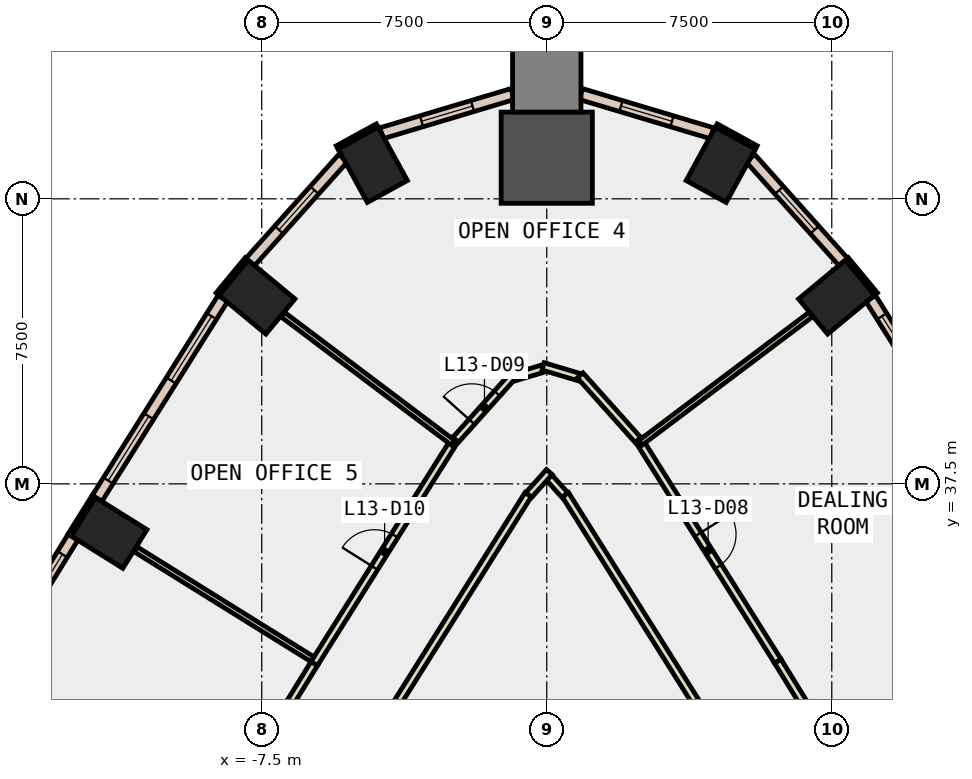
"""IFC4 building model, lengths in metres.
Left out: names, types, materials, properties, quantities, classifications, styles, units other than length and angle.
Written with IfcOpenShell. Run it as: python <this file> out.ifc"""

import sys

from ifc_helpers import new_model, si_unit, direction, frame, frame_2d, origin, origin_2d, place, context, subcontext, project, spatial, rectangle, extrude, element, fill, save


model = new_model("IFC4")
c1 = context("Model", 3, precision=1e-05, world=origin(), true_north=direction((0.0, 1.0)))
c2 = subcontext(c1, "Body", "Model", "MODEL_VIEW")
j1 = project(units=[si_unit("LENGTHUNIT", "METRE"), si_unit("PLANEANGLEUNIT", "RADIAN")], contexts=[c1])
p1 = place(None, origin())
s1 = spatial("IfcSite", under=j1, at=p1, CompositionType="ELEMENT")
p2 = place(p1, origin())
s2 = spatial("IfcBuilding", under=s1, at=p2, CompositionType="ELEMENT")
p3 = place(p2, frame((0.0, 0.0, 64.4)))
s3 = spatial("IfcBuildingStorey", under=s2, at=p3, CompositionType="ELEMENT", Elevation=64.4)
for number, where, z_axis, x_axis in (
    (1, (7.625, 42.414, -0.4), (0.0, 0.0, 1.0), (-0.638, 0.77, 0.0)),
    (2, (4.579, 45.895, -0.4), (0.0, 0.0, 1.0), (-0.877, 0.48, 0.0)),
):
    element("IfcColumn", number, at=place(p3, frame(where, z_axis=z_axis, x_axis=x_axis)), inside=s3, PredefinedType="COLUMN", context=c2, shape_type="SweptSolid", body=[
        extrude(rectangle(XDim=1.2, YDim=1.6, at=origin_2d()), origin(), (0.0, 0.0, 1.0), 4.2),
    ])
p4 = place(p3, frame((0.0, 46.082, -0.4), z_axis=(0.0, 0.0, 1.0), x_axis=(0.0, 1.0, 0.0)))
e3 = element("IfcColumn", 3, at=p4, inside=s3, PredefinedType="COLUMN", context=c2, shape_type="SweptSolid", body=[
    extrude(rectangle(XDim=2.4, YDim=2.4, at=origin_2d()), origin(), (0.0, 0.0, 1.0), 4.2),
])
for number, where, z_axis, x_axis in (
    (4, (-4.579, 45.895, -0.4), (0.0, 0.0, 1.0), (0.877, 0.48, 0.0)),
    (5, (-7.625, 42.414, -0.4), (0.0, 0.0, 1.0), (0.638, 0.77, 0.0)),
    (6, (-11.516, 36.211, -0.4), (0.0, 0.0, 1.0), (0.53, 0.848, 0.0)),
):
    element("IfcColumn", number, at=place(p3, frame(where, z_axis=z_axis, x_axis=x_axis)), inside=s3, PredefinedType="COLUMN", context=c2, shape_type="SweptSolid", body=[
        extrude(rectangle(XDim=1.2, YDim=1.6, at=origin_2d()), origin(), (0.0, 0.0, 1.0), 4.2),
    ])
p5 = place(p3, frame((0.0, 48.182, -0.4), z_axis=(0.0, 0.0, 1.0), x_axis=(0.0, 1.0, 0.0)))
e7 = element("IfcColumn", 7, at=p5, inside=s3, PredefinedType="COLUMN", context=c2, shape_type="SweptSolid", body=[
    extrude(rectangle(XDim=1.8, YDim=1.8, at=origin_2d()), origin(), (0.0, 0.0, 1.0), 4.2),
])
for number, where, z_axis, x_axis in (
    (8, (5.513, 46.352, 0.0), (0.0, 0.0, 1.0), (-0.877, 0.48, 0.0)),
    (9, (-4.461, 46.928, 0.0), (0.0, 0.0, 1.0), (-0.877, -0.48, 0.0)),
):
    element("IfcWall", number, at=place(p3, frame(where, z_axis=z_axis, x_axis=x_axis)), inside=s3, PredefinedType="STANDARD", context=c2, shape_type="SweptSolid", body=[
        extrude(rectangle(XDim=1.199, YDim=0.1, at=frame_2d((0.6, 0.0))), origin(), (0.0, 0.0, 1.0), 3.8),
    ])
for number, where, z_axis, x_axis in (
    (10, (8.662, 42.494, 0.0), (0.0, 0.0, 1.0), (-0.638, 0.77, 0.0)),
    (11, (-7.897, 43.418, 0.0), (0.0, 0.0, 1.0), (-0.638, -0.77, 0.0)),
):
    element("IfcWall", number, at=place(p3, frame(where, z_axis=z_axis, x_axis=x_axis)), inside=s3, PredefinedType="STANDARD", context=c2, shape_type="SweptSolid", body=[
        extrude(rectangle(XDim=1.2, YDim=0.1, at=frame_2d((0.6, 0.0))), origin(), (0.0, 0.0, 1.0), 3.8),
    ])
p6 = place(p3, frame((-11.919, 37.17, 0.0), z_axis=(0.0, 0.0, 1.0), x_axis=(-0.530273374944, -0.847826720401, 0.0)))
e12 = element("IfcWall", 12, at=p6, inside=s3, PredefinedType="STANDARD", context=c2, shape_type="SweptSolid", body=[
    extrude(rectangle(XDim=1.199, YDim=0.1, at=frame_2d((0.6, 0.0))), origin(), (0.0, 0.0, 1.0), 3.8),
])
p7 = place(p3, frame((11.833, 37.116, 0.0), z_axis=(0.0, 0.0, 1.0), x_axis=(-0.532322705893, 0.846541515102, 0.0)))
e13 = element("IfcWall", 13, at=p7, inside=s3, PredefinedType="STANDARD", context=c2, shape_type="SweptSolid", body=[
    extrude(rectangle(XDim=6.218, YDim=0.3, at=frame_2d((3.109, 0.0))), origin(), (0.0, 0.0, 1.0), 3.8),
])
p8 = place(p7, frame((0.555, 0.0, 0.9)))
e14 = element("IfcOpeningElement", 14, at=p8, cuts=e13, PredefinedType="OPENING", context=c2, shape_type="SweptSolid", body=[
    extrude(rectangle(XDim=2.0, YDim=2.6, at=frame_2d((1.0, 1.3))), frame((0.0, 0.16, 0.0), z_axis=(0.0, -1.0, 0.0), x_axis=(1.0, 0.0, 0.0)), (0.0, 0.0, 1.0), 0.32),
])
p9 = place(p7, frame((3.664, 0.0, 0.9)))
e15 = element("IfcOpeningElement", 15, at=p9, cuts=e13, PredefinedType="OPENING", context=c2, shape_type="SweptSolid", body=[
    extrude(rectangle(XDim=2.0, YDim=2.6, at=frame_2d((1.0, 1.3))), frame((0.0, 0.16, 0.0), z_axis=(0.0, -1.0, 0.0), x_axis=(1.0, 0.0, 0.0)), (0.0, 0.0, 1.0), 0.32),
])
p10 = place(p3, frame((7.803, 43.339, 0.0), z_axis=(0.0, 0.0, 1.0), x_axis=(-0.666901909312, 0.745145518242, 0.0)))
e16 = element("IfcWall", 16, at=p10, inside=s3, PredefinedType="STANDARD", context=c2, shape_type="SweptSolid", body=[
    extrude(rectangle(XDim=3.666, YDim=0.3, at=frame_2d((1.833, 0.0))), origin(), (0.0, 0.0, 1.0), 3.8),
])
p11 = place(p10, frame((1.133, 0.0, 0.9)))
e17 = element("IfcOpeningElement", 17, at=p11, cuts=e16, PredefinedType="OPENING", context=c2, shape_type="SweptSolid", body=[
    extrude(rectangle(XDim=1.4, YDim=2.6, at=frame_2d((0.7, 1.3))), frame((0.0, 0.16, 0.0), z_axis=(0.0, -1.0, 0.0), x_axis=(1.0, 0.0, 0.0)), (0.0, 0.0, 1.0), 0.32),
])
p12 = place(p3, frame((4.35, 46.725, 0.0), z_axis=(0.0, 0.0, 1.0), x_axis=(-0.958083325779, 0.286489687186, 0.0)))
e18 = element("IfcWall", 18, at=p12, inside=s3, PredefinedType="STANDARD", context=c2, shape_type="SweptSolid", body=[
    extrude(rectangle(XDim=3.602, YDim=0.3, at=frame_2d((1.801, 0.0))), origin(), (0.0, 0.0, 1.0), 3.8),
])
p13 = place(p12, frame((1.101, 0.0, 0.9)))
e19 = element("IfcOpeningElement", 19, at=p13, cuts=e18, PredefinedType="OPENING", context=c2, shape_type="SweptSolid", body=[
    extrude(rectangle(XDim=1.4, YDim=2.6, at=frame_2d((0.7, 1.3))), frame((0.0, 0.16, 0.0), z_axis=(0.0, -1.0, 0.0), x_axis=(1.0, 0.0, 0.0)), (0.0, 0.0, 1.0), 0.32),
])
p14 = place(p3, frame((-0.899, 47.757, 0.0), z_axis=(0.0, 0.0, 1.0), x_axis=(-0.958083325779, -0.286489687186, 0.0)))
e20 = element("IfcWall", 20, at=p14, inside=s3, PredefinedType="STANDARD", context=c2, shape_type="SweptSolid", body=[
    extrude(rectangle(XDim=3.602, YDim=0.3, at=frame_2d((1.801, 0.0))), origin(), (0.0, 0.0, 1.0), 3.8),
])
p15 = place(p14, frame((1.101, 0.0, 0.9)))
e21 = element("IfcOpeningElement", 21, at=p15, cuts=e20, PredefinedType="OPENING", context=c2, shape_type="SweptSolid", body=[
    extrude(rectangle(XDim=1.4, YDim=2.6, at=frame_2d((0.7, 1.3))), frame((0.0, 0.16, 0.0), z_axis=(0.0, -1.0, 0.0), x_axis=(1.0, 0.0, 0.0)), (0.0, 0.0, 1.0), 0.32),
])
p16 = place(p3, frame((-5.358, 46.071, 0.0), z_axis=(0.0, 0.0, 1.0), x_axis=(-0.666901909312, -0.745145518242, 0.0)))
e22 = element("IfcWall", 22, at=p16, inside=s3, PredefinedType="STANDARD", context=c2, shape_type="SweptSolid", body=[
    extrude(rectangle(XDim=3.666, YDim=0.3, at=frame_2d((1.833, 0.0))), origin(), (0.0, 0.0, 1.0), 3.8),
])
p17 = place(p16, frame((1.133, 0.0, 0.9)))
e23 = element("IfcOpeningElement", 23, at=p17, cuts=e22, PredefinedType="OPENING", context=c2, shape_type="SweptSolid", body=[
    extrude(rectangle(XDim=1.4, YDim=2.6, at=frame_2d((0.7, 1.3))), frame((0.0, 0.16, 0.0), z_axis=(0.0, -1.0, 0.0), x_axis=(1.0, 0.0, 0.0)), (0.0, 0.0, 1.0), 0.32),
])
p18 = place(p3, frame((-8.523, 42.38, 0.0), z_axis=(0.0, 0.0, 1.0), x_axis=(-0.532322705893, -0.846541515102, 0.0)))
e24 = element("IfcWall", 24, at=p18, inside=s3, PredefinedType="STANDARD", context=c2, shape_type="SweptSolid", body=[
    extrude(rectangle(XDim=6.218, YDim=0.3, at=frame_2d((3.109, 0.0))), origin(), (0.0, 0.0, 1.0), 3.8),
])
p19 = place(p18, frame((0.555, 0.0, 0.9)))
e25 = element("IfcOpeningElement", 25, at=p19, cuts=e24, PredefinedType="OPENING", context=c2, shape_type="SweptSolid", body=[
    extrude(rectangle(XDim=2.0, YDim=2.6, at=frame_2d((1.0, 1.3))), frame((0.0, 0.16, 0.0), z_axis=(0.0, -1.0, 0.0), x_axis=(1.0, 0.0, 0.0)), (0.0, 0.0, 1.0), 0.32),
])
p20 = place(p18, frame((3.664, 0.0, 0.9)))
e26 = element("IfcOpeningElement", 26, at=p20, cuts=e24, PredefinedType="OPENING", context=c2, shape_type="SweptSolid", body=[
    extrude(rectangle(XDim=2.0, YDim=2.6, at=frame_2d((1.0, 1.3))), frame((0.0, 0.16, 0.0), z_axis=(0.0, -1.0, 0.0), x_axis=(1.0, 0.0, 0.0)), (0.0, 0.0, 1.0), 0.32),
])
p21 = place(p3, frame((-12.466, 36.098, 0.0), z_axis=(0.0, 0.0, 1.0), x_axis=(-0.524239751329, -0.851570715282, 0.0)))
e27 = element("IfcWall", 27, at=p21, inside=s3, PredefinedType="STANDARD", context=c2, shape_type="SweptSolid", body=[
    extrude(rectangle(XDim=6.125, YDim=0.3, at=frame_2d((3.062, 0.0))), origin(), (0.0, 0.0, 1.0), 3.8),
])
p22 = place(p21, frame((0.531, 0.0, 0.9)))
e28 = element("IfcOpeningElement", 28, at=p22, cuts=e27, PredefinedType="OPENING", context=c2, shape_type="SweptSolid", body=[
    extrude(rectangle(XDim=2.0, YDim=2.6, at=frame_2d((1.0, 1.3))), frame((0.0, 0.16, 0.0), z_axis=(0.0, -1.0, 0.0), x_axis=(1.0, 0.0, 0.0)), (0.0, 0.0, 1.0), 0.32),
])
p23 = place(p21, frame((3.594, 0.0, 0.9)))
e29 = element("IfcOpeningElement", 29, at=p23, cuts=e27, PredefinedType="OPENING", context=c2, shape_type="SweptSolid", body=[
    extrude(rectangle(XDim=2.0, YDim=2.6, at=frame_2d((1.0, 1.3))), frame((0.0, 0.16, 0.0), z_axis=(0.0, -1.0, 0.0), x_axis=(1.0, 0.0, 0.0)), (0.0, 0.0, 1.0), 0.32),
])
p24 = place(p3, frame((4.043, 31.564, 0.0), z_axis=(0.0, 0.0, 1.0), x_axis=(-0.532301094997, 0.846555104092, 0.0)))
e30 = element("IfcWall", 30, at=p24, inside=s3, PredefinedType="PARTITIONING", context=c2, shape_type="SweptSolid", body=[
    extrude(rectangle(XDim=6.677, YDim=0.2, at=frame_2d((3.338, 0.0))), origin(), (0.0, 0.0, 1.0), 3.8),
])
p25 = place(p3, frame((0.476, 37.206, 0.0), z_axis=(0.0, 0.0, 1.0), x_axis=(-0.667027496744, 0.745033098988, 0.0)))
e31 = element("IfcWall", 31, at=p25, inside=s3, PredefinedType="PARTITIONING", context=c2, shape_type="SweptSolid", body=[
    extrude(rectangle(XDim=0.614, YDim=0.2, at=frame_2d((0.307, 0.0))), origin(), (0.0, 0.0, 1.0), 3.8),
])
p26 = place(p3, frame((0.067, 37.812, 0.0), z_axis=(0.0, 0.0, 1.0), x_axis=(-0.667338487106, -0.744754552606, 0.0)))
e32 = element("IfcWall", 32, at=p26, inside=s3, PredefinedType="PARTITIONING", context=c2, shape_type="SweptSolid", body=[
    extrude(rectangle(XDim=0.814, YDim=0.2, at=frame_2d((0.407, 0.0))), origin(), (0.0, 0.0, 1.0), 3.8),
])
p27 = place(p3, frame((-0.489, 37.216, 0.0), z_axis=(0.0, 0.0, 1.0), x_axis=(-0.532301094997, -0.846555104092, 0.0)))
e33 = element("IfcWall", 33, at=p27, inside=s3, PredefinedType="PARTITIONING", context=c2, shape_type="SweptSolid", body=[
    extrude(rectangle(XDim=6.677, YDim=0.2, at=frame_2d((3.338, 0.0))), origin(), (0.0, 0.0, 1.0), 3.8),
])
p28 = place(p3, frame((2.413, 38.665, 0.0), z_axis=(0.0, 0.0, 1.0), x_axis=(0.532328273879, -0.846538013812, 0.0)))
e34 = element("IfcWall", 34, at=p28, inside=s3, PredefinedType="PARTITIONING", context=c2, shape_type="SweptSolid", body=[
    extrude(rectangle(XDim=6.89, YDim=0.2, at=frame_2d((3.445, 0.0))), origin(), (0.0, 0.0, 1.0), 3.8),
])
p29 = place(p28, frame((2.945, 0.0, 0.0)))
e35 = element("IfcOpeningElement", 35, at=p29, cuts=e34, PredefinedType="OPENING", context=c2, shape_type="SweptSolid", body=[
    extrude(rectangle(XDim=1.0, YDim=2.1, at=frame_2d((0.5, 1.05))), frame((0.0, 0.11, 0.0), z_axis=(0.0, -1.0, 0.0), x_axis=(1.0, 0.0, 0.0)), (0.0, 0.0, 1.0), 0.22),
])
p30 = place(p3, frame((6.081, 32.832, 0.0), z_axis=(0.0, 0.0, 1.0), x_axis=(0.524062922014, -0.851679548756, 0.0)))
e36 = element("IfcWall", 36, at=p30, inside=s3, PredefinedType="PARTITIONING", context=c2, shape_type="SweptSolid", body=[
    extrude(rectangle(XDim=3.553, YDim=0.2, at=frame_2d((1.777, 0.0))), origin(), (0.0, 0.0, 1.0), 3.8),
])
p31 = place(p3, frame((-2.4, 38.655, 0.0), z_axis=(0.0, 0.0, 1.0), x_axis=(0.666791730919, 0.745244112743, 0.0)))
e37 = element("IfcWall", 37, at=p31, inside=s3, PredefinedType="PARTITIONING", context=c2, shape_type="SweptSolid", body=[
    extrude(rectangle(XDim=2.281, YDim=0.2, at=frame_2d((1.141, 0.0))), origin(), (0.0, 0.0, 1.0), 3.8),
])
p32 = place(p31, frame((0.641, 0.0, 0.0)))
e38 = element("IfcOpeningElement", 38, at=p32, cuts=e37, PredefinedType="OPENING", context=c2, shape_type="SweptSolid", body=[
    extrude(rectangle(XDim=1.0, YDim=2.1, at=frame_2d((0.5, 1.05))), frame((0.0, 0.11, 0.0), z_axis=(0.0, -1.0, 0.0), x_axis=(1.0, 0.0, 0.0)), (0.0, 0.0, 1.0), 0.22),
])
p33 = place(p3, frame((-0.849, 40.309, 0.0), z_axis=(0.0, 0.0, 1.0), x_axis=(0.958210118601, 0.286065322279, 0.0)))
e39 = element("IfcWall", 39, at=p33, inside=s3, PredefinedType="PARTITIONING", context=c2, shape_type="SweptSolid", body=[
    extrude(rectangle(XDim=0.786, YDim=0.2, at=frame_2d((0.393, 0.0))), origin(), (0.0, 0.0, 1.0), 3.8),
])
p34 = place(p3, frame((-0.096, 40.591, 0.0), z_axis=(0.0, 0.0, 1.0), x_axis=(0.958254449469, -0.285916788721, 0.0)))
e40 = element("IfcWall", 40, at=p34, inside=s3, PredefinedType="PARTITIONING", context=c2, shape_type="SweptSolid", body=[
    extrude(rectangle(XDim=0.986, YDim=0.2, at=frame_2d((0.493, 0.0))), origin(), (0.0, 0.0, 1.0), 3.8),
])
p35 = place(p3, frame((0.879, 40.355, 0.0), z_axis=(0.0, 0.0, 1.0), x_axis=(0.666791730919, -0.745244112743, 0.0)))
e41 = element("IfcWall", 41, at=p35, inside=s3, PredefinedType="PARTITIONING", context=c2, shape_type="SweptSolid", body=[
    extrude(rectangle(XDim=2.281, YDim=0.2, at=frame_2d((1.141, 0.0))), origin(), (0.0, 0.0, 1.0), 3.8),
])
p36 = place(p3, frame((-6.121, 32.768, 0.0), z_axis=(0.0, 0.0, 1.0), x_axis=(0.532309351336, 0.846549912574, 0.0)))
e42 = element("IfcWall", 42, at=p36, inside=s3, PredefinedType="PARTITIONING", context=c2, shape_type="SweptSolid", body=[
    extrude(rectangle(XDim=6.966, YDim=0.2, at=frame_2d((3.483, 0.0))), origin(), (0.0, 0.0, 1.0), 3.8),
])
p37 = place(p36, frame((2.983, 0.0, 0.0)))
e43 = element("IfcOpeningElement", 43, at=p37, cuts=e42, PredefinedType="OPENING", context=c2, shape_type="SweptSolid", body=[
    extrude(rectangle(XDim=1.0, YDim=2.1, at=frame_2d((0.5, 1.05))), frame((0.0, 0.11, 0.0), z_axis=(0.0, -1.0, 0.0), x_axis=(1.0, 0.0, 0.0)), (0.0, 0.0, 1.0), 0.22),
])
p38 = place(p3, frame((-9.884, 26.652, 0.0), z_axis=(0.0, 0.0, 1.0), x_axis=(0.524182788618, 0.851605779758, 0.0)))
e44 = element("IfcWall", 44, at=p38, inside=s3, PredefinedType="PARTITIONING", context=c2, shape_type="SweptSolid", body=[
    extrude(rectangle(XDim=7.18, YDim=0.2, at=frame_2d((3.59, 0.0))), origin(), (0.0, 0.0, 1.0), 3.8),
])
p39 = place(p3, frame((7.897, 29.69, 0.0), z_axis=(0.0, 0.0, 1.0), x_axis=(0.851604009471, 0.524185664677, 0.0)))
e45 = element("IfcWall", 45, at=p39, inside=s3, PredefinedType="PARTITIONING", context=c2, shape_type="SweptSolid", body=[
    extrude(rectangle(XDim=7.101, YDim=0.15, at=frame_2d((3.55, 0.0))), origin(), (0.0, 0.0, 1.0), 3.8),
])
for number, where, z_axis, x_axis in (
    (46, (2.466, 38.58, 0.0), (0.0, 0.0, 1.0), (0.799, 0.602, 0.0)),
    (47, (-2.466, 38.58, 0.0), (0.0, 0.0, 1.0), (-0.799, 0.602, 0.0)),
):
    element("IfcWall", number, at=place(p3, frame(where, z_axis=z_axis, x_axis=x_axis)), inside=s3, PredefinedType="PARTITIONING", context=c2, shape_type="SweptSolid", body=[
        extrude(rectangle(XDim=5.605, YDim=0.15, at=frame_2d((2.802, 0.0))), origin(), (0.0, 0.0, 1.0), 3.8),
    ])
p40 = place(p3, frame((-6.166, 32.885, 0.0), z_axis=(0.0, 0.0, 1.0), x_axis=(-0.84915518202, 0.528143424506, 0.0)))
e48 = element("IfcWall", 48, at=p40, inside=s3, PredefinedType="PARTITIONING", context=c2, shape_type="SweptSolid", body=[
    extrude(rectangle(XDim=5.48, YDim=0.15, at=frame_2d((2.74, 0.0))), origin(), (0.0, 0.0, 1.0), 3.8),
])
p41 = place(p9, origin())
e49 = element("IfcWindow", 49, at=p41, inside=s3, PartitioningType="SINGLE_PANEL", PredefinedType="WINDOW", context=c2, shape_type="SweptSolid", body=[
    extrude(rectangle(XDim=2.0, YDim=2.6, at=frame_2d((1.0, 1.3))), frame((0.0, 0.03, 0.0), z_axis=(0.0, -1.0, 0.0), x_axis=(1.0, 0.0, 0.0)), (0.0, 0.0, 1.0), 0.06),
])
fill(e15, e49)
p42 = place(p11, origin())
e50 = element("IfcWindow", 50, at=p42, inside=s3, PartitioningType="SINGLE_PANEL", PredefinedType="WINDOW", context=c2, shape_type="SweptSolid", body=[
    extrude(rectangle(XDim=1.4, YDim=2.6, at=frame_2d((0.7, 1.3))), frame((0.0, 0.03, 0.0), z_axis=(0.0, -1.0, 0.0), x_axis=(1.0, 0.0, 0.0)), (0.0, 0.0, 1.0), 0.06),
])
fill(e17, e50)
p43 = place(p13, origin())
e51 = element("IfcWindow", 51, at=p43, inside=s3, PartitioningType="SINGLE_PANEL", PredefinedType="WINDOW", context=c2, shape_type="SweptSolid", body=[
    extrude(rectangle(XDim=1.4, YDim=2.6, at=frame_2d((0.7, 1.3))), frame((0.0, 0.03, 0.0), z_axis=(0.0, -1.0, 0.0), x_axis=(1.0, 0.0, 0.0)), (0.0, 0.0, 1.0), 0.06),
])
fill(e19, e51)
p44 = place(p15, origin())
e52 = element("IfcWindow", 52, at=p44, inside=s3, PartitioningType="SINGLE_PANEL", PredefinedType="WINDOW", context=c2, shape_type="SweptSolid", body=[
    extrude(rectangle(XDim=1.4, YDim=2.6, at=frame_2d((0.7, 1.3))), frame((0.0, 0.03, 0.0), z_axis=(0.0, -1.0, 0.0), x_axis=(1.0, 0.0, 0.0)), (0.0, 0.0, 1.0), 0.06),
])
fill(e21, e52)
p45 = place(p17, origin())
e53 = element("IfcWindow", 53, at=p45, inside=s3, PartitioningType="SINGLE_PANEL", PredefinedType="WINDOW", context=c2, shape_type="SweptSolid", body=[
    extrude(rectangle(XDim=1.4, YDim=2.6, at=frame_2d((0.7, 1.3))), frame((0.0, 0.03, 0.0), z_axis=(0.0, -1.0, 0.0), x_axis=(1.0, 0.0, 0.0)), (0.0, 0.0, 1.0), 0.06),
])
fill(e23, e53)
p46 = place(p19, origin())
e54 = element("IfcWindow", 54, at=p46, inside=s3, PartitioningType="SINGLE_PANEL", PredefinedType="WINDOW", context=c2, shape_type="SweptSolid", body=[
    extrude(rectangle(XDim=2.0, YDim=2.6, at=frame_2d((1.0, 1.3))), frame((0.0, 0.03, 0.0), z_axis=(0.0, -1.0, 0.0), x_axis=(1.0, 0.0, 0.0)), (0.0, 0.0, 1.0), 0.06),
])
fill(e25, e54)
p47 = place(p20, origin())
e55 = element("IfcWindow", 55, at=p47, inside=s3, PartitioningType="SINGLE_PANEL", PredefinedType="WINDOW", context=c2, shape_type="SweptSolid", body=[
    extrude(rectangle(XDim=2.0, YDim=2.6, at=frame_2d((1.0, 1.3))), frame((0.0, 0.03, 0.0), z_axis=(0.0, -1.0, 0.0), x_axis=(1.0, 0.0, 0.0)), (0.0, 0.0, 1.0), 0.06),
])
fill(e26, e55)
p48 = place(p22, origin())
e56 = element("IfcWindow", 56, at=p48, inside=s3, PartitioningType="SINGLE_PANEL", PredefinedType="WINDOW", context=c2, shape_type="SweptSolid", body=[
    extrude(rectangle(XDim=2.0, YDim=2.6, at=frame_2d((1.0, 1.3))), frame((0.0, 0.03, 0.0), z_axis=(0.0, -1.0, 0.0), x_axis=(1.0, 0.0, 0.0)), (0.0, 0.0, 1.0), 0.06),
])
fill(e28, e56)
p49 = place(p29, origin())
e57 = element("IfcDoor", 57, at=p49, inside=s3, OperationType="SINGLE_SWING_LEFT", PredefinedType="DOOR", context=c2, shape_type="SweptSolid", body=[
    extrude(rectangle(XDim=1.0, YDim=2.1, at=frame_2d((0.5, 1.05))), frame((0.0, 0.025, 0.0), z_axis=(0.0, -1.0, 0.0), x_axis=(1.0, 0.0, 0.0)), (0.0, 0.0, 1.0), 0.05),
])
fill(e35, e57)
p50 = place(p32, origin())
e58 = element("IfcDoor", 58, at=p50, inside=s3, OperationType="SINGLE_SWING_LEFT", PredefinedType="DOOR", context=c2, shape_type="SweptSolid", body=[
    extrude(rectangle(XDim=1.0, YDim=2.1, at=frame_2d((0.5, 1.05))), frame((0.0, 0.025, 0.0), z_axis=(0.0, -1.0, 0.0), x_axis=(1.0, 0.0, 0.0)), (0.0, 0.0, 1.0), 0.05),
])
fill(e38, e58)
p51 = place(p37, origin())
e59 = element("IfcDoor", 59, at=p51, inside=s3, OperationType="SINGLE_SWING_LEFT", PredefinedType="DOOR", context=c2, shape_type="SweptSolid", body=[
    extrude(rectangle(XDim=1.0, YDim=2.1, at=frame_2d((0.5, 1.05))), frame((0.0, 0.025, 0.0), z_axis=(0.0, -1.0, 0.0), x_axis=(1.0, 0.0, 0.0)), (0.0, 0.0, 1.0), 0.05),
])
fill(e43, e59)
save(model, sys.argv[1])
